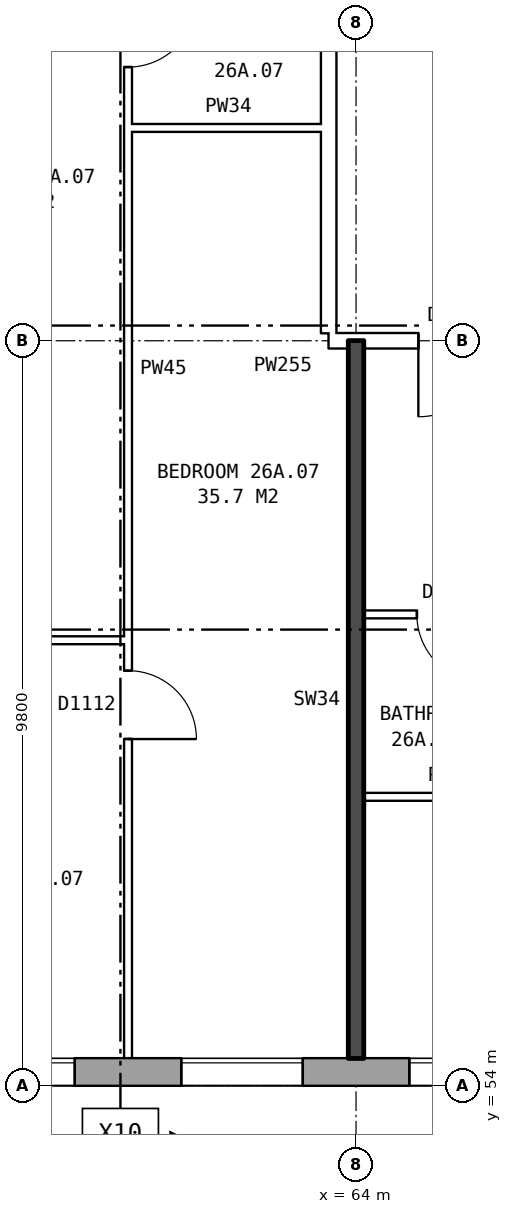
"""IFC4 building model, lengths in metres.
Left out: names, types, materials, properties, quantities, classifications, styles, units other than length and angle.
Written with IfcOpenShell. Run it as: python <this file> out.ifc"""

import sys

from ifc_helpers import new_model, si_unit, direction, frame, frame_2d, origin, place, context, subcontext, project, spatial, rectangle, extrude, element, fill, save


model = new_model("IFC4")
c1 = context("Model", 3, precision=1e-05, world=origin(), true_north=direction((0.0, 1.0)))
c2 = subcontext(c1, "Body", "Model", "MODEL_VIEW")
j1 = project(units=[si_unit("LENGTHUNIT", "METRE"), si_unit("PLANEANGLEUNIT", "RADIAN")], contexts=[c1])
p1 = place(None, origin())
s1 = spatial("IfcSite", under=j1, at=p1, CompositionType="ELEMENT")
p2 = place(p1, origin())
s2 = spatial("IfcBuilding", under=s1, at=p2, CompositionType="ELEMENT")
p3 = place(p2, frame((0.0, 0.0, 96.4)))
s3 = spatial("IfcBuildingStorey", under=s2, at=p3, CompositionType="ELEMENT", Elevation=96.4)
p4 = place(p3, frame((28.075, 54.18, 0.0), z_axis=(0.0, 0.0, 1.0), x_axis=(1.0, 0.0, 0.0)))
e1 = element("IfcWall", 1, at=p4, inside=s3, PredefinedType="STANDARD", context=c2, shape_type="SweptSolid", body=[
    extrude(rectangle(XDim=44.851, YDim=0.36, at=frame_2d((22.425, 0.0))), origin(), (0.0, 0.0, 1.0), 2.85),
])
p5 = place(p4, frame((0.4, 0.0, 0.8)))
e2 = element("IfcOpeningElement", 2, at=p5, cuts=e1, PredefinedType="OPENING", context=c2, shape_type="SweptSolid", body=[
    extrude(rectangle(XDim=0.8, YDim=0.9, at=frame_2d((0.4, 0.45))), frame((0.0, 0.19, 0.0), z_axis=(0.0, -1.0, 0.0), x_axis=(1.0, 0.0, 0.0)), (0.0, 0.0, 1.0), 0.38),
])
p6 = place(p4, frame((3.625, 0.0, 0.8)))
e3 = element("IfcOpeningElement", 3, at=p6, cuts=e1, PredefinedType="OPENING", context=c2, shape_type="SweptSolid", body=[
    extrude(rectangle(XDim=1.6, YDim=1.8, at=frame_2d((0.8, 0.9))), frame((0.0, 0.19, 0.0), z_axis=(0.0, -1.0, 0.0), x_axis=(1.0, 0.0, 0.0)), (0.0, 0.0, 1.0), 0.38),
])
p7 = place(p4, frame((6.625, 0.0, 0.8)))
e4 = element("IfcOpeningElement", 4, at=p7, cuts=e1, PredefinedType="OPENING", context=c2, shape_type="SweptSolid", body=[
    extrude(rectangle(XDim=1.6, YDim=1.8, at=frame_2d((0.8, 0.9))), frame((0.0, 0.19, 0.0), z_axis=(0.0, -1.0, 0.0), x_axis=(1.0, 0.0, 0.0)), (0.0, 0.0, 1.0), 0.38),
])
p8 = place(p4, frame((9.625, 0.0, 0.8)))
e5 = element("IfcOpeningElement", 5, at=p8, cuts=e1, PredefinedType="OPENING", context=c2, shape_type="SweptSolid", body=[
    extrude(rectangle(XDim=1.6, YDim=1.8, at=frame_2d((0.8, 0.9))), frame((0.0, 0.19, 0.0), z_axis=(0.0, -1.0, 0.0), x_axis=(1.0, 0.0, 0.0)), (0.0, 0.0, 1.0), 0.38),
])
p9 = place(p4, frame((12.625, 0.0, 0.8)))
e6 = element("IfcOpeningElement", 6, at=p9, cuts=e1, PredefinedType="OPENING", context=c2, shape_type="SweptSolid", body=[
    extrude(rectangle(XDim=1.6, YDim=1.8, at=frame_2d((0.8, 0.9))), frame((0.0, 0.19, 0.0), z_axis=(0.0, -1.0, 0.0), x_axis=(1.0, 0.0, 0.0)), (0.0, 0.0, 1.0), 0.38),
])
p10 = place(p4, frame((15.625, 0.0, 0.8)))
e7 = element("IfcOpeningElement", 7, at=p10, cuts=e1, PredefinedType="OPENING", context=c2, shape_type="SweptSolid", body=[
    extrude(rectangle(XDim=1.6, YDim=1.8, at=frame_2d((0.8, 0.9))), frame((0.0, 0.19, 0.0), z_axis=(0.0, -1.0, 0.0), x_axis=(1.0, 0.0, 0.0)), (0.0, 0.0, 1.0), 0.38),
])
p11 = place(p4, frame((18.625, 0.0, 0.8)))
e8 = element("IfcOpeningElement", 8, at=p11, cuts=e1, PredefinedType="OPENING", context=c2, shape_type="SweptSolid", body=[
    extrude(rectangle(XDim=1.6, YDim=1.8, at=frame_2d((0.8, 0.9))), frame((0.0, 0.19, 0.0), z_axis=(0.0, -1.0, 0.0), x_axis=(1.0, 0.0, 0.0)), (0.0, 0.0, 1.0), 0.38),
])
p12 = place(p4, frame((21.625, 0.0, 0.8)))
e9 = element("IfcOpeningElement", 9, at=p12, cuts=e1, PredefinedType="OPENING", context=c2, shape_type="SweptSolid", body=[
    extrude(rectangle(XDim=1.6, YDim=1.8, at=frame_2d((0.8, 0.9))), frame((0.0, 0.19, 0.0), z_axis=(0.0, -1.0, 0.0), x_axis=(1.0, 0.0, 0.0)), (0.0, 0.0, 1.0), 0.38),
])
p13 = place(p4, frame((24.625, 0.0, 0.8)))
e10 = element("IfcOpeningElement", 10, at=p13, cuts=e1, PredefinedType="OPENING", context=c2, shape_type="SweptSolid", body=[
    extrude(rectangle(XDim=1.6, YDim=1.8, at=frame_2d((0.8, 0.9))), frame((0.0, 0.19, 0.0), z_axis=(0.0, -1.0, 0.0), x_axis=(1.0, 0.0, 0.0)), (0.0, 0.0, 1.0), 0.38),
])
p14 = place(p4, frame((27.625, 0.0, 0.8)))
e11 = element("IfcOpeningElement", 11, at=p14, cuts=e1, PredefinedType="OPENING", context=c2, shape_type="SweptSolid", body=[
    extrude(rectangle(XDim=1.6, YDim=1.8, at=frame_2d((0.8, 0.9))), frame((0.0, 0.19, 0.0), z_axis=(0.0, -1.0, 0.0), x_axis=(1.0, 0.0, 0.0)), (0.0, 0.0, 1.0), 0.38),
])
p15 = place(p4, frame((30.625, 0.0, 0.8)))
e12 = element("IfcOpeningElement", 12, at=p15, cuts=e1, PredefinedType="OPENING", context=c2, shape_type="SweptSolid", body=[
    extrude(rectangle(XDim=1.6, YDim=1.8, at=frame_2d((0.8, 0.9))), frame((0.0, 0.19, 0.0), z_axis=(0.0, -1.0, 0.0), x_axis=(1.0, 0.0, 0.0)), (0.0, 0.0, 1.0), 0.38),
])
p16 = place(p4, frame((33.625, 0.0, 0.8)))
e13 = element("IfcOpeningElement", 13, at=p16, cuts=e1, PredefinedType="OPENING", context=c2, shape_type="SweptSolid", body=[
    extrude(rectangle(XDim=1.6, YDim=1.8, at=frame_2d((0.8, 0.9))), frame((0.0, 0.19, 0.0), z_axis=(0.0, -1.0, 0.0), x_axis=(1.0, 0.0, 0.0)), (0.0, 0.0, 1.0), 0.38),
])
p17 = place(p4, frame((36.625, 0.0, 0.8)))
e14 = element("IfcOpeningElement", 14, at=p17, cuts=e1, PredefinedType="OPENING", context=c2, shape_type="SweptSolid", body=[
    extrude(rectangle(XDim=1.6, YDim=1.8, at=frame_2d((0.8, 0.9))), frame((0.0, 0.19, 0.0), z_axis=(0.0, -1.0, 0.0), x_axis=(1.0, 0.0, 0.0)), (0.0, 0.0, 1.0), 0.38),
])
p18 = place(p4, frame((39.625, 0.0, 0.8)))
e15 = element("IfcOpeningElement", 15, at=p18, cuts=e1, PredefinedType="OPENING", context=c2, shape_type="SweptSolid", body=[
    extrude(rectangle(XDim=1.6, YDim=1.8, at=frame_2d((0.8, 0.9))), frame((0.0, 0.19, 0.0), z_axis=(0.0, -1.0, 0.0), x_axis=(1.0, 0.0, 0.0)), (0.0, 0.0, 1.0), 0.38),
])
p19 = place(p4, frame((42.125, 0.0, 0.8)))
e16 = element("IfcOpeningElement", 16, at=p19, cuts=e1, PredefinedType="OPENING", context=c2, shape_type="SweptSolid", body=[
    extrude(rectangle(XDim=1.0, YDim=1.8, at=frame_2d((0.5, 0.9))), frame((0.0, 0.19, 0.0), z_axis=(0.0, -1.0, 0.0), x_axis=(1.0, 0.0, 0.0)), (0.0, 0.0, 1.0), 0.38),
])
p20 = place(p4, frame((1.65, 0.0, 0.8)))
e17 = element("IfcOpeningElement", 17, at=p20, cuts=e1, PredefinedType="OPENING", context=c2, shape_type="SweptSolid", body=[
    extrude(rectangle(XDim=1.6, YDim=1.8, at=frame_2d((0.8, 0.9))), frame((0.0, 0.19, 0.0), z_axis=(0.0, -1.0, 0.0), x_axis=(1.0, 0.0, 0.0)), (0.0, 0.0, 1.0), 0.38),
])
p21 = place(p4, frame((43.425, 0.0, 0.8)))
e18 = element("IfcOpeningElement", 18, at=p21, cuts=e1, PredefinedType="OPENING", context=c2, shape_type="SweptSolid", body=[
    extrude(rectangle(XDim=1.0, YDim=0.9, at=frame_2d((0.5, 0.45))), frame((0.0, 0.19, 0.0), z_axis=(0.0, -1.0, 0.0), x_axis=(1.0, 0.0, 0.0)), (0.0, 0.0, 1.0), 0.38),
])
p22 = place(p3, frame((63.64, 63.9, 0.0), z_axis=(0.0, 0.0, 1.0), x_axis=(0.0, 1.0, 0.0)))
e19 = element("IfcWall", 19, at=p22, inside=s3, PredefinedType="PARTITIONING", context=c2, shape_type="SweptSolid", body=[
    extrude(rectangle(XDim=12.2, YDim=0.2, at=frame_2d((6.1, 0.0))), origin(), (0.0, 0.0, 1.0), 2.85),
])
p23 = place(p22, frame((5.1, 0.0, 0.0)))
e20 = element("IfcOpeningElement", 20, at=p23, cuts=e19, PredefinedType="OPENING", context=c2, shape_type="SweptSolid", body=[
    extrude(rectangle(XDim=2.0, YDim=2.1, at=frame_2d((1.0, 1.05))), frame((0.0, 0.11, 0.0), z_axis=(0.0, -1.0, 0.0), x_axis=(1.0, 0.0, 0.0)), (0.0, 0.0, 1.0), 0.22),
])
p24 = place(p3, frame((64.1, 57.8, 0.0), z_axis=(0.0, 0.0, 1.0), x_axis=(1.0, 0.0, 0.0)))
e21 = element("IfcWall", 21, at=p24, inside=s3, PredefinedType="PARTITIONING", context=c2, shape_type="SweptSolid", body=[
    extrude(rectangle(XDim=2.3, YDim=0.1, at=frame_2d((1.15, 0.0))), origin(), (0.0, 0.0, 1.0), 2.85),
])
p25 = place(p3, frame((55.0, 59.86, 0.0), z_axis=(0.0, 0.0, 1.0), x_axis=(1.0, 0.0, 0.0)))
e22 = element("IfcWall", 22, at=p25, inside=s3, PredefinedType="PARTITIONING", context=c2, shape_type="SweptSolid", body=[
    extrude(rectangle(XDim=6.0, YDim=0.1, at=frame_2d((3.0, 0.0))), origin(), (0.0, 0.0, 1.0), 2.85),
])
p26 = place(p25, frame((4.05, 0.0, 0.0)))
e23 = element("IfcOpeningElement", 23, at=p26, cuts=e22, PredefinedType="OPENING", context=c2, shape_type="SweptSolid", body=[
    extrude(rectangle(XDim=0.9, YDim=2.1, at=frame_2d((0.45, 1.05))), frame((0.0, 0.06, 0.0), z_axis=(0.0, -1.0, 0.0), x_axis=(1.0, 0.0, 0.0)), (0.0, 0.0, 1.0), 0.12),
])
p27 = place(p25, frame((1.05, 0.0, 0.0)))
e24 = element("IfcOpeningElement", 24, at=p27, cuts=e22, PredefinedType="OPENING", context=c2, shape_type="SweptSolid", body=[
    extrude(rectangle(XDim=0.9, YDim=2.1, at=frame_2d((0.45, 1.05))), frame((0.0, 0.06, 0.0), z_axis=(0.0, -1.0, 0.0), x_axis=(1.0, 0.0, 0.0)), (0.0, 0.0, 1.0), 0.12),
])
p28 = place(p3, frame((64.1, 60.2, 0.0), z_axis=(0.0, 0.0, 1.0), x_axis=(1.0, 0.0, 0.0)))
e25 = element("IfcWall", 25, at=p28, inside=s3, PredefinedType="PARTITIONING", context=c2, shape_type="SweptSolid", body=[
    extrude(rectangle(XDim=5.8, YDim=0.1, at=frame_2d((2.9, 0.0))), origin(), (0.0, 0.0, 1.0), 2.85),
])
p29 = place(p28, frame((3.6, 0.0, 0.0)))
e26 = element("IfcOpeningElement", 26, at=p29, cuts=e25, PredefinedType="OPENING", context=c2, shape_type="SweptSolid", body=[
    extrude(rectangle(XDim=0.9, YDim=2.1, at=frame_2d((0.45, 1.05))), frame((0.0, 0.06, 0.0), z_axis=(0.0, -1.0, 0.0), x_axis=(1.0, 0.0, 0.0)), (0.0, 0.0, 1.0), 0.12),
])
p30 = place(p28, frame((0.7, 0.0, 0.0)))
e27 = element("IfcOpeningElement", 27, at=p30, cuts=e25, PredefinedType="OPENING", context=c2, shape_type="SweptSolid", body=[
    extrude(rectangle(XDim=0.9, YDim=2.1, at=frame_2d((0.45, 1.05))), frame((0.0, 0.06, 0.0), z_axis=(0.0, -1.0, 0.0), x_axis=(1.0, 0.0, 0.0)), (0.0, 0.0, 1.0), 0.12),
])
p31 = place(p3, frame((63.64, 63.8, 0.0), z_axis=(0.0, 0.0, 1.0), x_axis=(1.0, 0.0, 0.0)))
e28 = element("IfcWall", 28, at=p31, inside=s3, PredefinedType="PARTITIONING", context=c2, shape_type="SweptSolid", body=[
    extrude(rectangle(XDim=3.0, YDim=0.2, at=frame_2d((1.5, 0.0))), origin(), (0.0, 0.0, 1.0), 2.85),
])
p32 = place(p31, frame((1.18, 0.0, 0.0)))
e29 = element("IfcOpeningElement", 29, at=p32, cuts=e28, PredefinedType="OPENING", context=c2, shape_type="SweptSolid", body=[
    extrude(rectangle(XDim=1.0, YDim=2.1, at=frame_2d((0.5, 1.05))), frame((0.0, 0.11, 0.0), z_axis=(0.0, -1.0, 0.0), x_axis=(1.0, 0.0, 0.0)), (0.0, 0.0, 1.0), 0.22),
])
p33 = place(p3, frame((61.0, 66.6, 0.0), z_axis=(0.0, 0.0, 1.0), x_axis=(1.0, 0.0, 0.0)))
e30 = element("IfcWall", 30, at=p33, inside=s3, PredefinedType="PARTITIONING", context=c2, shape_type="SweptSolid", body=[
    extrude(rectangle(XDim=2.64, YDim=0.1, at=frame_2d((1.32, 0.0))), origin(), (0.0, 0.0, 1.0), 2.85),
])
p34 = place(p3, frame((61.0, 54.36, 0.0), z_axis=(0.0, 0.0, 1.0), x_axis=(0.0, 1.0, 0.0)))
e31 = element("IfcWall", 31, at=p34, inside=s3, PredefinedType="PARTITIONING", context=c2, shape_type="SweptSolid", body=[
    extrude(rectangle(XDim=14.34, YDim=0.1, at=frame_2d((7.17, 0.0))), origin(), (0.0, 0.0, 1.0), 2.85),
])
p35 = place(p34, frame((4.2, 0.0, 0.0)))
e32 = element("IfcOpeningElement", 32, at=p35, cuts=e31, PredefinedType="OPENING", context=c2, shape_type="SweptSolid", body=[
    extrude(rectangle(XDim=0.9, YDim=2.1, at=frame_2d((0.45, 1.05))), frame((0.0, 0.06, 0.0), z_axis=(0.0, -1.0, 0.0), x_axis=(1.0, 0.0, 0.0)), (0.0, 0.0, 1.0), 0.12),
])
p36 = place(p34, frame((13.04, 0.0, 0.0)))
e33 = element("IfcOpeningElement", 33, at=p36, cuts=e31, PredefinedType="OPENING", context=c2, shape_type="SweptSolid", body=[
    extrude(rectangle(XDim=0.9, YDim=2.1, at=frame_2d((0.45, 1.05))), frame((0.0, 0.06, 0.0), z_axis=(0.0, -1.0, 0.0), x_axis=(1.0, 0.0, 0.0)), (0.0, 0.0, 1.0), 0.12),
])
p37 = place(p3, frame((64.0, 54.36, 0.0), z_axis=(0.0, 0.0, 1.0), x_axis=(0.0, 1.0, 0.0)))
e34 = element("IfcWall", 34, at=p37, inside=s3, PredefinedType="SOLIDWALL", context=c2, shape_type="SweptSolid", body=[
    extrude(rectangle(XDim=9.44, YDim=0.2, at=frame_2d((4.72, 0.0))), origin(), (0.0, 0.0, 1.0), 2.85),
])
p38 = place(p15, origin())
e35 = element("IfcWindow", 35, at=p38, inside=s3, PartitioningType="SINGLE_PANEL", PredefinedType="WINDOW", context=c2, shape_type="SweptSolid", body=[
    extrude(rectangle(XDim=1.6, YDim=1.8, at=frame_2d((0.8, 0.9))), frame((0.0, 0.15, 0.0), z_axis=(0.0, -1.0, 0.0), x_axis=(1.0, 0.0, 0.0)), (0.0, 0.0, 1.0), 0.06),
])
fill(e12, e35)
p39 = place(p16, origin())
e36 = element("IfcWindow", 36, at=p39, inside=s3, PartitioningType="SINGLE_PANEL", PredefinedType="WINDOW", context=c2, shape_type="SweptSolid", body=[
    extrude(rectangle(XDim=1.6, YDim=1.8, at=frame_2d((0.8, 0.9))), frame((0.0, 0.15, 0.0), z_axis=(0.0, -1.0, 0.0), x_axis=(1.0, 0.0, 0.0)), (0.0, 0.0, 1.0), 0.06),
])
fill(e13, e36)
p40 = place(p17, origin())
e37 = element("IfcWindow", 37, at=p40, inside=s3, PartitioningType="SINGLE_PANEL", PredefinedType="WINDOW", context=c2, shape_type="SweptSolid", body=[
    extrude(rectangle(XDim=1.6, YDim=1.8, at=frame_2d((0.8, 0.9))), frame((0.0, 0.15, 0.0), z_axis=(0.0, -1.0, 0.0), x_axis=(1.0, 0.0, 0.0)), (0.0, 0.0, 1.0), 0.06),
])
fill(e14, e37)
p41 = place(p32, frame((1.0, 0.0, 0.0), z_axis=(0.0, 0.0, 1.0), x_axis=(-1.0, 0.0, 0.0)))
e38 = element("IfcDoor", 38, at=p41, inside=s3, OperationType="SINGLE_SWING_RIGHT", PredefinedType="DOOR", context=c2, shape_type="SweptSolid", body=[
    extrude(rectangle(XDim=1.0, YDim=2.1, at=frame_2d((0.5, 1.05))), frame((0.0, 0.025, 0.0), z_axis=(0.0, -1.0, 0.0), x_axis=(1.0, 0.0, 0.0)), (0.0, 0.0, 1.0), 0.05),
])
fill(e29, e38)
p42 = place(p30, frame((0.9, 0.0, 0.0), z_axis=(0.0, 0.0, 1.0), x_axis=(-1.0, 0.0, 0.0)))
e39 = element("IfcDoor", 39, at=p42, inside=s3, OperationType="SINGLE_SWING_LEFT", PredefinedType="DOOR", context=c2, shape_type="SweptSolid", body=[
    extrude(rectangle(XDim=0.9, YDim=2.1, at=frame_2d((0.45, 1.05))), frame((0.0, 0.025, 0.0), z_axis=(0.0, -1.0, 0.0), x_axis=(1.0, 0.0, 0.0)), (0.0, 0.0, 1.0), 0.05),
])
fill(e27, e39)
p43 = place(p35, frame((0.9, 0.0, 0.0), z_axis=(0.0, 0.0, 1.0), x_axis=(-1.0, 0.0, 0.0)))
e40 = element("IfcDoor", 40, at=p43, inside=s3, OperationType="SINGLE_SWING_RIGHT", PredefinedType="DOOR", context=c2, shape_type="SweptSolid", body=[
    extrude(rectangle(XDim=0.9, YDim=2.1, at=frame_2d((0.45, 1.05))), frame((0.0, 0.025, 0.0), z_axis=(0.0, -1.0, 0.0), x_axis=(1.0, 0.0, 0.0)), (0.0, 0.0, 1.0), 0.05),
])
fill(e32, e40)
p44 = place(p36, frame((0.9, 0.0, 0.0), z_axis=(0.0, 0.0, 1.0), x_axis=(-1.0, 0.0, 0.0)))
e41 = element("IfcDoor", 41, at=p44, inside=s3, OperationType="SINGLE_SWING_LEFT", PredefinedType="DOOR", context=c2, shape_type="SweptSolid", body=[
    extrude(rectangle(XDim=0.9, YDim=2.1, at=frame_2d((0.45, 1.05))), frame((0.0, 0.025, 0.0), z_axis=(0.0, -1.0, 0.0), x_axis=(1.0, 0.0, 0.0)), (0.0, 0.0, 1.0), 0.05),
])
fill(e33, e41)
save(model, sys.argv[1])
